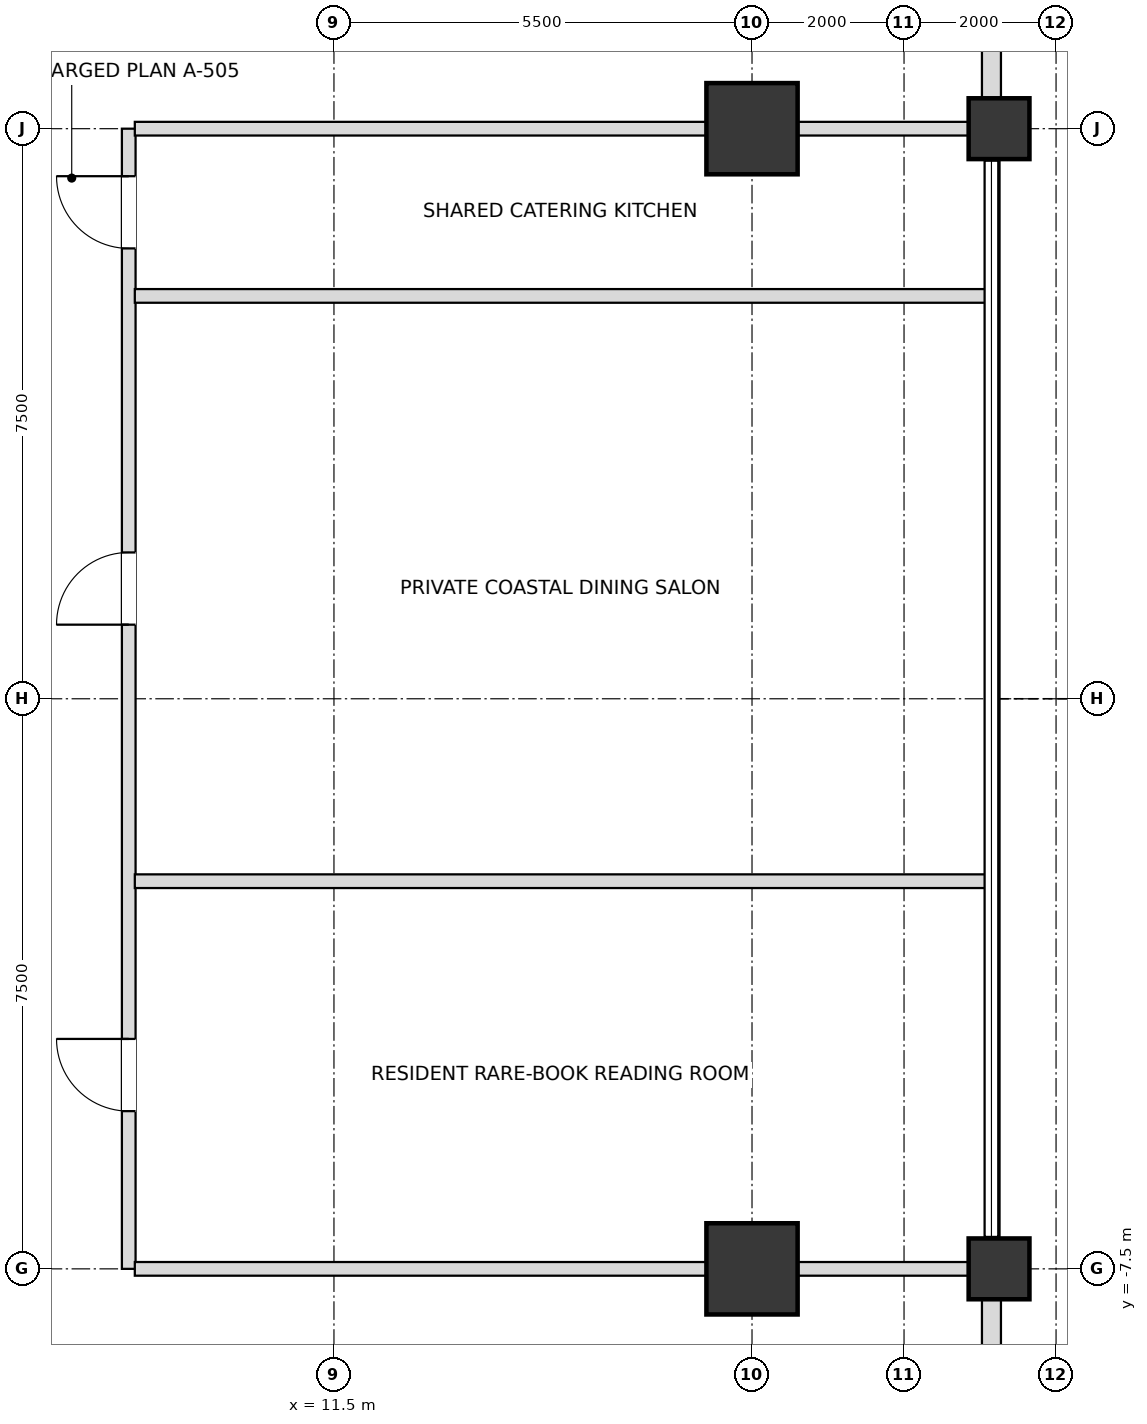
"""IFC4 building model, lengths in metres.
Left out: names, types, materials, properties, quantities, classifications, styles, units other than length and angle.
Written with IfcOpenShell. Run it as: python <this file> out.ifc"""

import sys

from ifc_helpers import new_model, si_unit, direction, frame, frame_2d, origin, origin_2d, place, context, subcontext, project, spatial, rectangle, extrude, element, fill, save


model = new_model("IFC4")
c1 = context("Model", 3, precision=1e-05, world=origin(), true_north=direction((0.0, 1.0)))
c2 = subcontext(c1, "Body", "Model", "MODEL_VIEW")
j1 = project(units=[si_unit("LENGTHUNIT", "METRE"), si_unit("PLANEANGLEUNIT", "RADIAN")], contexts=[c1])
p1 = place(None, origin())
s1 = spatial("IfcSite", under=j1, at=p1, CompositionType="ELEMENT")
p2 = place(p1, origin())
s2 = spatial("IfcBuilding", under=s1, at=p2, CompositionType="ELEMENT")
p3 = place(p2, frame((0.0, 0.0, 133.2)))
s3 = spatial("IfcBuildingStorey", under=s2, at=p3, CompositionType="ELEMENT", Elevation=133.2)
for number, where, z_axis, x_axis in (
    (1, (17.0, -7.5, 0.0), (0.0, 0.0, 1.0), (1.0, 0.0, 0.0)),
    (2, (17.0, 7.5, 0.0), (0.0, 0.0, 1.0), (1.0, 0.0, 0.0)),
):
    element("IfcColumn", number, at=place(p3, frame(where, z_axis=z_axis, x_axis=x_axis)), inside=s3, PredefinedType="USERDEFINED", context=c2, shape_type="SweptSolid", body=[
        extrude(rectangle(XDim=1.2, YDim=1.2, at=origin_2d()), origin(), (0.0, 0.0, 1.0), 3.6),
    ])
for number, where, z_axis, x_axis in (
    (3, (20.25, -7.5, 0.0), (0.0, 0.0, 1.0), (1.0, 0.0, 0.0)),
    (4, (20.25, 7.5, 0.0), (0.0, 0.0, 1.0), (1.0, 0.0, 0.0)),
):
    element("IfcColumn", number, at=place(p3, frame(where, z_axis=z_axis, x_axis=x_axis)), inside=s3, PredefinedType="COLUMN", context=c2, shape_type="SweptSolid", body=[
        extrude(rectangle(XDim=0.8, YDim=0.8, at=origin_2d()), origin(), (0.0, 0.0, 1.0), 3.6),
    ])
p4 = place(p3, frame((20.15, -12.605, 0.0), z_axis=(0.0, 0.0, 1.0), x_axis=(0.0, 1.0, 0.0)))
e5 = element("IfcWall", 5, at=p4, inside=s3, PredefinedType="SOLIDWALL", context=c2, shape_type="SweptSolid", body=[
    extrude(rectangle(XDim=4.71, YDim=0.25, at=frame_2d((2.355, 0.0))), origin(), (0.0, 0.0, 1.0), 2.736),
])
p5 = place(p4, frame((1.455, 0.0, 0.72)))
e6 = element("IfcOpeningElement", 6, at=p5, cuts=e5, PredefinedType="OPENING", context=c2, shape_type="SweptSolid", body=[
    extrude(rectangle(XDim=1.8, YDim=1.68, at=frame_2d((0.9, 0.84))), frame((0.0, 0.135, 0.0), z_axis=(0.0, -1.0, 0.0), x_axis=(1.0, 0.0, 0.0)), (0.0, 0.0, 1.0), 0.27),
])
p6 = place(p3, frame((20.15, 7.895, 0.0), z_axis=(0.0, 0.0, 1.0), x_axis=(0.0, 1.0, 0.0)))
e7 = element("IfcWall", 7, at=p6, inside=s3, PredefinedType="SOLIDWALL", context=c2, shape_type="SweptSolid", body=[
    extrude(rectangle(XDim=4.71, YDim=0.25, at=frame_2d((2.355, 0.0))), origin(), (0.0, 0.0, 1.0), 2.736),
])
p7 = place(p6, frame((1.455, 0.0, 0.72)))
e8 = element("IfcOpeningElement", 8, at=p7, cuts=e7, PredefinedType="OPENING", context=c2, shape_type="SweptSolid", body=[
    extrude(rectangle(XDim=1.8, YDim=1.68, at=frame_2d((0.9, 0.84))), frame((0.0, 0.135, 0.0), z_axis=(0.0, -1.0, 0.0), x_axis=(1.0, 0.0, 0.0)), (0.0, 0.0, 1.0), 0.27),
])
p8 = place(p3, frame((8.8, -7.5, 0.0), z_axis=(0.0, 0.0, 1.0), x_axis=(0.0, 1.0, 0.0)))
e9 = element("IfcWall", 9, at=p8, inside=s3, PredefinedType="PARTITIONING", context=c2, shape_type="SweptSolid", body=[
    extrude(rectangle(XDim=15.0, YDim=0.18, at=frame_2d((7.5, 0.0))), origin(), (0.0, 0.0, 1.0), 3.38),
])
p9 = place(p8, frame((2.075, 0.0, 0.0)))
e10 = element("IfcOpeningElement", 10, at=p9, cuts=e9, PredefinedType="OPENING", context=c2, shape_type="SweptSolid", body=[
    extrude(rectangle(XDim=0.95, YDim=2.15, at=frame_2d((0.475, 1.075))), frame((0.0, 0.1, 0.0), z_axis=(0.0, -1.0, 0.0), x_axis=(1.0, 0.0, 0.0)), (0.0, 0.0, 1.0), 0.2),
])
p10 = place(p8, frame((8.475, 0.0, 0.0)))
e11 = element("IfcOpeningElement", 11, at=p10, cuts=e9, PredefinedType="OPENING", context=c2, shape_type="SweptSolid", body=[
    extrude(rectangle(XDim=0.95, YDim=2.15, at=frame_2d((0.475, 1.075))), frame((0.0, 0.1, 0.0), z_axis=(0.0, -1.0, 0.0), x_axis=(1.0, 0.0, 0.0)), (0.0, 0.0, 1.0), 0.2),
])
p11 = place(p8, frame((13.425, 0.0, 0.0)))
e12 = element("IfcOpeningElement", 12, at=p11, cuts=e9, PredefinedType="OPENING", context=c2, shape_type="SweptSolid", body=[
    extrude(rectangle(XDim=0.95, YDim=2.15, at=frame_2d((0.475, 1.075))), frame((0.0, 0.1, 0.0), z_axis=(0.0, -1.0, 0.0), x_axis=(1.0, 0.0, 0.0)), (0.0, 0.0, 1.0), 0.2),
])
p12 = place(p3, frame((8.88, -7.5, 0.0), z_axis=(0.0, 0.0, 1.0), x_axis=(1.0, 0.0, 0.0)))
e13 = element("IfcWall", 13, at=p12, inside=s3, PredefinedType="PARTITIONING", context=c2, shape_type="SweptSolid", body=[
    extrude(rectangle(XDim=11.27, YDim=0.18, at=frame_2d((5.635, 0.0))), origin(), (0.0, 0.0, 1.0), 2.816),
])
for number, where, z_axis, x_axis in (
    (14, (8.88, -2.4, 0.0), (0.0, 0.0, 1.0), (1.0, 0.0, 0.0)),
    (15, (8.88, 5.3, 0.0), (0.0, 0.0, 1.0), (1.0, 0.0, 0.0)),
):
    element("IfcWall", number, at=place(p3, frame(where, z_axis=z_axis, x_axis=x_axis)), inside=s3, PredefinedType="PARTITIONING", context=c2, shape_type="SweptSolid", body=[
        extrude(rectangle(XDim=11.19, YDim=0.18, at=frame_2d((5.595, 0.0))), origin(), (0.0, 0.0, 1.0), 2.816),
    ])
p13 = place(p3, frame((8.88, 7.5, 0.0), z_axis=(0.0, 0.0, 1.0), x_axis=(1.0, 0.0, 0.0)))
e16 = element("IfcWall", 16, at=p13, inside=s3, PredefinedType="PARTITIONING", context=c2, shape_type="SweptSolid", body=[
    extrude(rectangle(XDim=11.27, YDim=0.18, at=frame_2d((5.635, 0.0))), origin(), (0.0, 0.0, 1.0), 2.816),
])
p14 = place(p9, origin())
e17 = element("IfcDoor", 17, at=p14, inside=s3, OperationType="SINGLE_SWING_RIGHT", PredefinedType="DOOR", context=c2, shape_type="SweptSolid", body=[
    extrude(rectangle(XDim=0.95, YDim=2.15, at=frame_2d((0.475, 1.075))), frame((0.0, 0.025, 0.0), z_axis=(0.0, -1.0, 0.0), x_axis=(1.0, 0.0, 0.0)), (0.0, 0.0, 1.0), 0.05),
])
fill(e10, e17)
p15 = place(p10, origin())
e18 = element("IfcDoor", 18, at=p15, inside=s3, OperationType="SINGLE_SWING_LEFT", PredefinedType="DOOR", context=c2, shape_type="SweptSolid", body=[
    extrude(rectangle(XDim=0.95, YDim=2.15, at=frame_2d((0.475, 1.075))), frame((0.0, 0.025, 0.0), z_axis=(0.0, -1.0, 0.0), x_axis=(1.0, 0.0, 0.0)), (0.0, 0.0, 1.0), 0.05),
])
fill(e11, e18)
p16 = place(p11, origin())
e19 = element("IfcDoor", 19, at=p16, inside=s3, OperationType="SINGLE_SWING_RIGHT", PredefinedType="DOOR", context=c2, shape_type="SweptSolid", body=[
    extrude(rectangle(XDim=0.95, YDim=2.15, at=frame_2d((0.475, 1.075))), frame((0.0, 0.025, 0.0), z_axis=(0.0, -1.0, 0.0), x_axis=(1.0, 0.0, 0.0)), (0.0, 0.0, 1.0), 0.05),
])
fill(e12, e19)
save(model, sys.argv[1])
